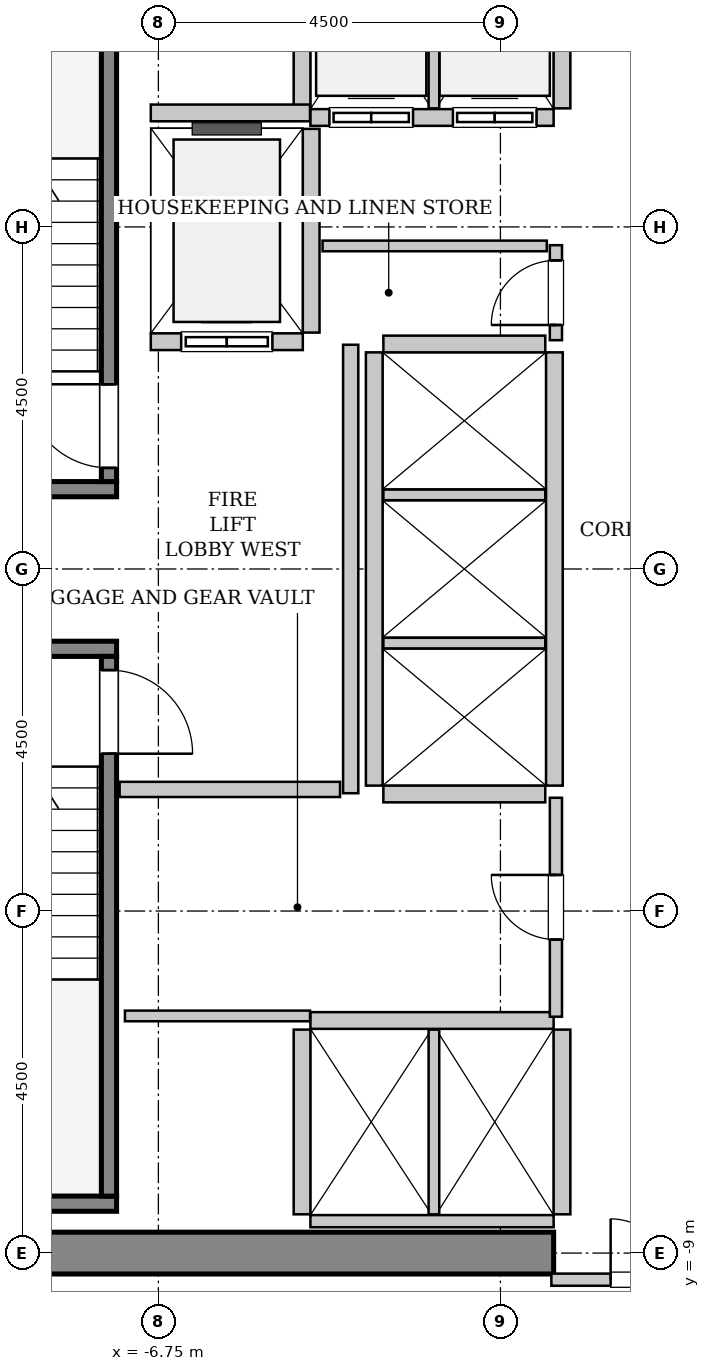
"""IFC4 building model, lengths in metres.
Left out: names, types, materials, properties, quantities, classifications, styles, units other than length and angle.
Written with IfcOpenShell. Run it as: python <this file> out.ifc"""

import sys

from ifc_helpers import new_model, si_unit, direction, frame, frame_2d, origin, place, context, subcontext, project, spatial, rectangle, extrude, source, transform, mapped, element, fill, save


model = new_model("IFC4")
c1 = context("Model", 3, precision=1e-05, world=origin(), true_north=direction((0.0, 1.0)))
c2 = subcontext(c1, "Body", "Model", "MODEL_VIEW")
j1 = project(units=[si_unit("LENGTHUNIT", "METRE"), si_unit("PLANEANGLEUNIT", "RADIAN")], contexts=[c1])
p1 = place(None, origin())
s1 = spatial("IfcSite", under=j1, at=p1, CompositionType="ELEMENT")
p2 = place(p1, origin())
s2 = spatial("IfcBuilding", under=s1, at=p2, CompositionType="ELEMENT")
p3 = place(p2, frame((0.0, 0.0, 132.6)))
s3 = spatial("IfcBuildingStorey", under=s2, at=p3, CompositionType="ELEMENT", Elevation=132.6)
m1 = source(origin(), c2, "Body", "SweptSolid", [
    extrude(rectangle(XDim=9.975, YDim=0.55, at=frame_2d((4.987, 0.0))), origin(), (0.0, 0.0, 1.0), 3.8),
])
p4 = place(p3, frame((-11.525, -9.0, 0.0), z_axis=(0.0, 0.0, 1.0), x_axis=(1.0, 0.0, 0.0)))
e1 = element("IfcWall", 1, at=p4, inside=s3, PredefinedType="SHEAR", context=c2, shape_type="MappedRepresentation", body=[
    mapped(m1, transform((0.0, 0.0, 0.0), x_axis=(1.0, 0.0, 0.0), y_axis=(0.0, 1.0, 0.0), z_axis=(0.0, 0.0, 1.0), scale=1.0)),
])
m2 = source(origin(), c2, "Body", "SweptSolid", [
    extrude(rectangle(XDim=3.4, YDim=0.2, at=frame_2d((1.7, 0.0))), origin(), (0.0, 0.0, 1.0), 3.8),
])
p5 = place(p3, frame((-7.3, 1.05, 0.0), z_axis=(0.0, 0.0, 1.0), x_axis=(-1.0, 0.0, 0.0)))
e2 = element("IfcWall", 2, at=p5, inside=s3, PredefinedType="SOLIDWALL", context=c2, shape_type="MappedRepresentation", body=[
    mapped(m2, transform((0.0, 0.0, 0.0), x_axis=(1.0, 0.0, 0.0), y_axis=(0.0, 1.0, 0.0), z_axis=(0.0, 0.0, 1.0), scale=1.0)),
])
m3 = source(origin(), c2, "Body", "SweptSolid", [
    extrude(rectangle(XDim=7.1, YDim=0.2, at=frame_2d((3.55, 0.0))), origin(), (0.0, 0.0, 1.0), 3.8),
])
p6 = place(p3, frame((-7.4, 1.15, 0.0), z_axis=(0.0, 0.0, 1.0), x_axis=(0.0, 1.0, 0.0)))
e3 = element("IfcWall", 3, at=p6, inside=s3, PredefinedType="SOLIDWALL", context=c2, shape_type="MappedRepresentation", body=[
    mapped(m3, transform((0.0, 0.0, 0.0), x_axis=(1.0, 0.0, 0.0), y_axis=(0.0, 1.0, 0.0), z_axis=(0.0, 0.0, 1.0), scale=1.0)),
])
p7 = place(p6, frame((0.18, 0.0, 0.0)))
e4 = element("IfcOpeningElement", 4, at=p7, cuts=e3, PredefinedType="OPENING", context=c2, shape_type="SweptSolid", body=[
    extrude(rectangle(XDim=1.1, YDim=2.15, at=frame_2d((0.55, 1.075))), frame((0.0, 0.11, 0.0), z_axis=(0.0, -1.0, 0.0), x_axis=(1.0, 0.0, 0.0)), (0.0, 0.0, 1.0), 0.22),
])
p8 = place(p3, frame((-10.7, -1.05, 0.0), z_axis=(0.0, 0.0, 1.0), x_axis=(1.0, 0.0, 0.0)))
e5 = element("IfcWall", 5, at=p8, inside=s3, PredefinedType="SOLIDWALL", context=c2, shape_type="MappedRepresentation", body=[
    mapped(m2, transform((0.0, 0.0, 0.0), x_axis=(1.0, 0.0, 0.0), y_axis=(0.0, 1.0, 0.0), z_axis=(0.0, 0.0, 1.0), scale=1.0)),
])
m4 = source(origin(), c2, "Body", "SweptSolid", [
    extrude(rectangle(XDim=3.68, YDim=0.2, at=frame_2d((1.84, 0.0))), origin(), (0.0, 0.0, 1.0), 3.8),
])
p9 = place(p3, frame((-10.98, -8.35, 0.0), z_axis=(0.0, 0.0, 1.0), x_axis=(1.0, 0.0, 0.0)))
e6 = element("IfcWall", 6, at=p9, inside=s3, PredefinedType="SOLIDWALL", context=c2, shape_type="MappedRepresentation", body=[
    mapped(m4, transform((0.0, 0.0, 0.0), x_axis=(1.0, 0.0, 0.0), y_axis=(0.0, 1.0, 0.0), z_axis=(0.0, 0.0, 1.0), scale=1.0)),
])
p10 = place(p3, frame((-7.4, -1.15, 0.0), z_axis=(0.0, 0.0, 1.0), x_axis=(0.0, -1.0, 0.0)))
e7 = element("IfcWall", 7, at=p10, inside=s3, PredefinedType="SOLIDWALL", context=c2, shape_type="MappedRepresentation", body=[
    mapped(m3, transform((0.0, 0.0, 0.0), x_axis=(1.0, 0.0, 0.0), y_axis=(0.0, 1.0, 0.0), z_axis=(0.0, 0.0, 1.0), scale=1.0)),
])
p11 = place(p10, frame((0.18, 0.0, 0.0)))
e8 = element("IfcOpeningElement", 8, at=p11, cuts=e7, PredefinedType="OPENING", context=c2, shape_type="SweptSolid", body=[
    extrude(rectangle(XDim=1.1, YDim=2.15, at=frame_2d((0.55, 1.075))), frame((0.0, 0.11, 0.0), z_axis=(0.0, -1.0, 0.0), x_axis=(1.0, 0.0, 0.0)), (0.0, 0.0, 1.0), 0.22),
])
m5 = source(origin(), c2, "Body", "SweptSolid", [
    extrude(rectangle(XDim=2.0, YDim=0.22, at=frame_2d((1.0, 0.0))), origin(), (0.0, 0.0, 1.0), 3.535),
])
p12 = place(p3, frame((-6.85, 2.99, 0.0), z_axis=(0.0, 0.0, 1.0), x_axis=(1.0, 0.0, 0.0)))
e9 = element("IfcWall", 9, at=p12, inside=s3, PredefinedType="SOLIDWALL", context=c2, shape_type="MappedRepresentation", body=[
    mapped(m5, transform((0.0, 0.0, 0.0), x_axis=(1.0, 0.0, 0.0), y_axis=(0.0, 1.0, 0.0), z_axis=(0.0, 0.0, 1.0), scale=1.0)),
])
p13 = place(p12, frame((0.4, 0.0, 0.0)))
e10 = element("IfcOpeningElement", 10, at=p13, cuts=e9, PredefinedType="OPENING", context=c2, shape_type="SweptSolid", body=[
    extrude(rectangle(XDim=1.2, YDim=2.2, at=frame_2d((0.6, 1.1))), frame((0.0, 0.12, 0.0), z_axis=(0.0, -1.0, 0.0), x_axis=(1.0, 0.0, 0.0)), (0.0, 0.0, 1.0), 0.24),
])
m6 = source(origin(), c2, "Body", "SweptSolid", [
    extrude(rectangle(XDim=2.68, YDim=0.22, at=frame_2d((1.34, 0.0))), origin(), (0.0, 0.0, 1.0), 3.535),
])
p14 = place(p3, frame((-4.74, 3.11, 0.0), z_axis=(0.0, 0.0, 1.0), x_axis=(0.0, 1.0, 0.0)))
e11 = element("IfcWall", 11, at=p14, inside=s3, PredefinedType="SOLIDWALL", context=c2, shape_type="MappedRepresentation", body=[
    mapped(m6, transform((0.0, 0.0, 0.0), x_axis=(1.0, 0.0, 0.0), y_axis=(0.0, 1.0, 0.0), z_axis=(0.0, 0.0, 1.0), scale=1.0)),
])
m7 = source(origin(), c2, "Body", "SweptSolid", [
    extrude(rectangle(XDim=3.2, YDim=0.22, at=frame_2d((1.6, 0.0))), origin(), (0.0, 0.0, 1.0), 3.535),
])
p15 = place(p3, frame((-4.75, 5.94, 0.0), z_axis=(0.0, 0.0, 1.0), x_axis=(1.0, 0.0, 0.0)))
e12 = element("IfcWall", 12, at=p15, inside=s3, PredefinedType="SOLIDWALL", context=c2, shape_type="MappedRepresentation", body=[
    mapped(m7, transform((0.0, 0.0, 0.0), x_axis=(1.0, 0.0, 0.0), y_axis=(0.0, 1.0, 0.0), z_axis=(0.0, 0.0, 1.0), scale=1.0)),
])
p16 = place(p15, frame((0.25, 0.0, 0.0)))
e13 = element("IfcOpeningElement", 13, at=p16, cuts=e12, PredefinedType="OPENING", context=c2, shape_type="SweptSolid", body=[
    extrude(rectangle(XDim=1.1, YDim=2.2, at=frame_2d((0.55, 1.1))), frame((0.0, 0.12, 0.0), z_axis=(0.0, -1.0, 0.0), x_axis=(1.0, 0.0, 0.0)), (0.0, 0.0, 1.0), 0.24),
])
p17 = place(p15, frame((1.875, 0.0, 0.0)))
e14 = element("IfcOpeningElement", 14, at=p17, cuts=e12, PredefinedType="OPENING", context=c2, shape_type="SweptSolid", body=[
    extrude(rectangle(XDim=1.1, YDim=2.2, at=frame_2d((0.55, 1.1))), frame((0.0, 0.12, 0.0), z_axis=(0.0, -1.0, 0.0), x_axis=(1.0, 0.0, 0.0)), (0.0, 0.0, 1.0), 0.24),
])
m8 = source(origin(), c2, "Body", "SweptSolid", [
    extrude(rectangle(XDim=2.43, YDim=0.22, at=frame_2d((1.215, 0.0))), origin(), (0.0, 0.0, 1.0), 3.535),
])
p18 = place(p3, frame((-4.86, 8.49, 0.0), z_axis=(0.0, 0.0, 1.0), x_axis=(0.0, -1.0, 0.0)))
e15 = element("IfcWall", 15, at=p18, inside=s3, PredefinedType="SOLIDWALL", context=c2, shape_type="MappedRepresentation", body=[
    mapped(m8, transform((0.0, 0.0, 0.0), x_axis=(1.0, 0.0, 0.0), y_axis=(0.0, 1.0, 0.0), z_axis=(0.0, 0.0, 1.0), scale=1.0)),
])
m9 = source(origin(), c2, "Body", "SweptSolid", [
    extrude(rectangle(XDim=2.43, YDim=0.14, at=frame_2d((1.215, 0.0))), origin(), (0.0, 0.0, 1.0), 3.535),
])
p19 = place(p3, frame((-3.125, 6.06, 0.0), z_axis=(0.0, 0.0, 1.0), x_axis=(0.0, 1.0, 0.0)))
e16 = element("IfcWall", 16, at=p19, inside=s3, PredefinedType="PARTITIONING", context=c2, shape_type="MappedRepresentation", body=[
    mapped(m9, transform((0.0, 0.0, 0.0), x_axis=(1.0, 0.0, 0.0), y_axis=(0.0, 1.0, 0.0), z_axis=(0.0, 0.0, 1.0), scale=1.0)),
])
p20 = place(p3, frame((-1.44, 6.06, 0.0), z_axis=(0.0, 0.0, 1.0), x_axis=(0.0, 1.0, 0.0)))
e17 = element("IfcWall", 17, at=p20, inside=s3, PredefinedType="SOLIDWALL", context=c2, shape_type="MappedRepresentation", body=[
    mapped(m8, transform((0.0, 0.0, 0.0), x_axis=(1.0, 0.0, 0.0), y_axis=(0.0, 1.0, 0.0), z_axis=(0.0, 0.0, 1.0), scale=1.0)),
])
p21 = place(p3, frame((-1.55, -5.94, 0.0), z_axis=(0.0, 0.0, 1.0), x_axis=(-1.0, 0.0, 0.0)))
e18 = element("IfcWall", 18, at=p21, inside=s3, PredefinedType="SOLIDWALL", context=c2, shape_type="MappedRepresentation", body=[
    mapped(m7, transform((0.0, 0.0, 0.0), x_axis=(1.0, 0.0, 0.0), y_axis=(0.0, 1.0, 0.0), z_axis=(0.0, 0.0, 1.0), scale=1.0)),
])
m10 = source(origin(), c2, "Body", "SweptSolid", [
    extrude(rectangle(XDim=3.2, YDim=0.16, at=frame_2d((1.6, 0.0))), origin(), (0.0, 0.0, 1.0), 2.425),
])
p22 = place(p3, frame((-4.75, -8.58, 0.0), z_axis=(0.0, 0.0, 1.0), x_axis=(1.0, 0.0, 0.0)))
e19 = element("IfcWall", 19, at=p22, inside=s3, PredefinedType="PARTITIONING", context=c2, shape_type="MappedRepresentation", body=[
    mapped(m10, transform((0.0, 0.0, 0.0), x_axis=(1.0, 0.0, 0.0), y_axis=(0.0, 1.0, 0.0), z_axis=(0.0, 0.0, 1.0), scale=1.0)),
])
p23 = place(p3, frame((-4.86, -6.06, 0.0), z_axis=(0.0, 0.0, 1.0), x_axis=(0.0, -1.0, 0.0)))
e20 = element("IfcWall", 20, at=p23, inside=s3, PredefinedType="SOLIDWALL", context=c2, shape_type="MappedRepresentation", body=[
    mapped(m8, transform((0.0, 0.0, 0.0), x_axis=(1.0, 0.0, 0.0), y_axis=(0.0, 1.0, 0.0), z_axis=(0.0, 0.0, 1.0), scale=1.0)),
])
p24 = place(p3, frame((-3.125, -8.49, 0.0), z_axis=(0.0, 0.0, 1.0), x_axis=(0.0, 1.0, 0.0)))
e21 = element("IfcWall", 21, at=p24, inside=s3, PredefinedType="PARTITIONING", context=c2, shape_type="MappedRepresentation", body=[
    mapped(m9, transform((0.0, 0.0, 0.0), x_axis=(1.0, 0.0, 0.0), y_axis=(0.0, 1.0, 0.0), z_axis=(0.0, 0.0, 1.0), scale=1.0)),
])
p25 = place(p3, frame((-1.44, -8.49, 0.0), z_axis=(0.0, 0.0, 1.0), x_axis=(0.0, 1.0, 0.0)))
e22 = element("IfcWall", 22, at=p25, inside=s3, PredefinedType="SOLIDWALL", context=c2, shape_type="MappedRepresentation", body=[
    mapped(m8, transform((0.0, 0.0, 0.0), x_axis=(1.0, 0.0, 0.0), y_axis=(0.0, 1.0, 0.0), z_axis=(0.0, 0.0, 1.0), scale=1.0)),
])
m11 = source(origin(), c2, "Body", "SweptSolid", [
    extrude(rectangle(XDim=5.7, YDim=0.22, at=frame_2d((2.85, 0.0))), origin(), (0.0, 0.0, 1.0), 3.535),
])
for number, where, z_axis, x_axis in (
    (23, (-1.54, -2.85, 0.0), (0.0, 0.0, 1.0), (0.0, 1.0, 0.0)),
    (24, (-3.91, 2.85, 0.0), (0.0, 0.0, 1.0), (0.0, -1.0, 0.0)),
):
    element("IfcWall", number, at=place(p3, frame(where, z_axis=z_axis, x_axis=x_axis)), inside=s3, PredefinedType="SOLIDWALL", context=c2, shape_type="MappedRepresentation", body=[
        mapped(m11, transform((0.0, 0.0, 0.0), x_axis=(1.0, 0.0, 0.0), y_axis=(0.0, 1.0, 0.0), z_axis=(0.0, 0.0, 1.0), scale=1.0)),
    ])
m12 = source(origin(), c2, "Body", "SweptSolid", [
    extrude(rectangle(XDim=2.13, YDim=0.22, at=frame_2d((1.065, 0.0))), origin(), (0.0, 0.0, 1.0), 3.535),
])
p26 = place(p3, frame((-3.79, -2.96, 0.0), z_axis=(0.0, 0.0, 1.0), x_axis=(1.0, 0.0, 0.0)))
e25 = element("IfcWall", 25, at=p26, inside=s3, PredefinedType="SOLIDWALL", context=c2, shape_type="MappedRepresentation", body=[
    mapped(m12, transform((0.0, 0.0, 0.0), x_axis=(1.0, 0.0, 0.0), y_axis=(0.0, 1.0, 0.0), z_axis=(0.0, 0.0, 1.0), scale=1.0)),
])
m13 = source(origin(), c2, "Body", "SweptSolid", [
    extrude(rectangle(XDim=2.13, YDim=0.14, at=frame_2d((1.065, 0.0))), origin(), (0.0, 0.0, 1.0), 3.535),
])
for number, where, z_axis, x_axis in (
    (26, (-3.79, -0.975, 0.0), (0.0, 0.0, 1.0), (1.0, 0.0, 0.0)),
    (27, (-3.79, 0.975, 0.0), (0.0, 0.0, 1.0), (1.0, 0.0, 0.0)),
):
    element("IfcWall", number, at=place(p3, frame(where, z_axis=z_axis, x_axis=x_axis)), inside=s3, PredefinedType="PARTITIONING", context=c2, shape_type="MappedRepresentation", body=[
        mapped(m13, transform((0.0, 0.0, 0.0), x_axis=(1.0, 0.0, 0.0), y_axis=(0.0, 1.0, 0.0), z_axis=(0.0, 0.0, 1.0), scale=1.0)),
    ])
p27 = place(p3, frame((-1.66, 2.96, 0.0), z_axis=(0.0, 0.0, 1.0), x_axis=(-1.0, 0.0, 0.0)))
e28 = element("IfcWall", 28, at=p27, inside=s3, PredefinedType="SOLIDWALL", context=c2, shape_type="MappedRepresentation", body=[
    mapped(m12, transform((0.0, 0.0, 0.0), x_axis=(1.0, 0.0, 0.0), y_axis=(0.0, 1.0, 0.0), z_axis=(0.0, 0.0, 1.0), scale=1.0)),
])
m14 = source(origin(), c2, "Body", "SweptSolid", [
    extrude(rectangle(XDim=2.095, YDim=0.22, at=frame_2d((1.048, 0.0))), origin(), (0.0, 0.0, 1.0), 3.535),
])
p28 = place(p3, frame((-6.85, 6.0, 0.0), z_axis=(0.0, 0.0, 1.0), x_axis=(1.0, 0.0, 0.0)))
e29 = element("IfcWall", 29, at=p28, inside=s3, PredefinedType="SOLIDWALL", context=c2, shape_type="MappedRepresentation", body=[
    mapped(m14, transform((0.0, 0.0, 0.0), x_axis=(1.0, 0.0, 0.0), y_axis=(0.0, 1.0, 0.0), z_axis=(0.0, 0.0, 1.0), scale=1.0)),
])
m15 = source(origin(), c2, "Body", "SweptSolid", [
    extrude(rectangle(XDim=5.9, YDim=0.2, at=frame_2d((2.95, 0.0))), origin(), (0.0, 0.0, 1.0), 3.535),
])
p29 = place(p3, frame((-4.22, -2.95, 0.0), z_axis=(0.0, 0.0, 1.0), x_axis=(0.0, 1.0, 0.0)))
e30 = element("IfcWall", 30, at=p29, inside=s3, PredefinedType="PARTITIONING", context=c2, shape_type="MappedRepresentation", body=[
    mapped(m15, transform((0.0, 0.0, 0.0), x_axis=(1.0, 0.0, 0.0), y_axis=(0.0, 1.0, 0.0), z_axis=(0.0, 0.0, 1.0), scale=1.0)),
])
m16 = source(origin(), c2, "Body", "SweptSolid", [
    extrude(rectangle(XDim=2.9, YDim=0.2, at=frame_2d((1.45, 0.0))), origin(), (0.0, 0.0, 1.0), 3.535),
])
p30 = place(p3, frame((-7.26, -2.9, 0.0), z_axis=(0.0, 0.0, 1.0), x_axis=(1.0, 0.0, 0.0)))
e31 = element("IfcWall", 31, at=p30, inside=s3, PredefinedType="PARTITIONING", context=c2, shape_type="MappedRepresentation", body=[
    mapped(m16, transform((0.0, 0.0, 0.0), x_axis=(1.0, 0.0, 0.0), y_axis=(0.0, 1.0, 0.0), z_axis=(0.0, 0.0, 1.0), scale=1.0)),
])
m17 = source(origin(), c2, "Body", "SweptSolid", [
    extrude(rectangle(XDim=3.16, YDim=0.16, at=frame_2d((1.58, 0.0))), origin(), (0.0, 0.0, 1.0), 2.425),
])
p31 = place(p3, frame((-1.58, -9.35, 0.0), z_axis=(0.0, 0.0, 1.0), x_axis=(1.0, 0.0, 0.0)))
e32 = element("IfcWall", 32, at=p31, inside=s3, PredefinedType="PARTITIONING", context=c2, shape_type="MappedRepresentation", body=[
    mapped(m17, transform((0.0, 0.0, 0.0), x_axis=(1.0, 0.0, 0.0), y_axis=(0.0, 1.0, 0.0), z_axis=(0.0, 0.0, 1.0), scale=1.0)),
])
p32 = place(p31, frame((0.78, 0.0, 0.0)))
e33 = element("IfcOpeningElement", 33, at=p32, cuts=e32, PredefinedType="OPENING", context=c2, shape_type="SweptSolid", body=[
    extrude(rectangle(XDim=1.6, YDim=2.3, at=frame_2d((0.8, 1.15))), frame((0.0, 0.09, 0.0), z_axis=(0.0, -1.0, 0.0), x_axis=(1.0, 0.0, 0.0)), (0.0, 0.0, 1.0), 0.18),
])
m18 = source(origin(), c2, "Body", "SweptSolid", [
    extrude(rectangle(XDim=1.25, YDim=0.16, at=frame_2d((0.625, 0.0))), origin(), (0.0, 0.0, 1.0), 3.535),
])
p33 = place(p3, frame((-1.52, 3.01, 0.0), z_axis=(0.0, 0.0, 1.0), x_axis=(0.0, 1.0, 0.0)))
e34 = element("IfcWall", 34, at=p33, inside=s3, PredefinedType="PARTITIONING", context=c2, shape_type="MappedRepresentation", body=[
    mapped(m18, transform((0.0, 0.0, 0.0), x_axis=(1.0, 0.0, 0.0), y_axis=(0.0, 1.0, 0.0), z_axis=(0.0, 0.0, 1.0), scale=1.0)),
])
p34 = place(p33, frame((0.2, 0.0, 0.0)))
e35 = element("IfcOpeningElement", 35, at=p34, cuts=e34, PredefinedType="OPENING", context=c2, shape_type="SweptSolid", body=[
    extrude(rectangle(XDim=0.85, YDim=2.1, at=frame_2d((0.425, 1.05))), frame((0.0, 0.09, 0.0), z_axis=(0.0, -1.0, 0.0), x_axis=(1.0, 0.0, 0.0)), (0.0, 0.0, 1.0), 0.18),
])
m19 = source(origin(), c2, "Body", "SweptSolid", [
    extrude(rectangle(XDim=2.95, YDim=0.14, at=frame_2d((1.475, 0.0))), origin(), (0.0, 0.0, 1.0), 3.535),
])
p35 = place(p3, frame((-4.59, 4.25, 0.0), z_axis=(0.0, 0.0, 1.0), x_axis=(1.0, 0.0, 0.0)))
e36 = element("IfcWall", 36, at=p35, inside=s3, PredefinedType="PARTITIONING", context=c2, shape_type="MappedRepresentation", body=[
    mapped(m19, transform((0.0, 0.0, 0.0), x_axis=(1.0, 0.0, 0.0), y_axis=(0.0, 1.0, 0.0), z_axis=(0.0, 0.0, 1.0), scale=1.0)),
])
m20 = source(origin(), c2, "Body", "SweptSolid", [
    extrude(rectangle(XDim=2.88, YDim=0.16, at=frame_2d((1.44, 0.0))), origin(), (0.0, 0.0, 1.0), 3.535),
])
p36 = place(p3, frame((-1.52, -5.89, 0.0), z_axis=(0.0, 0.0, 1.0), x_axis=(0.0, 1.0, 0.0)))
e37 = element("IfcWall", 37, at=p36, inside=s3, PredefinedType="PARTITIONING", context=c2, shape_type="MappedRepresentation", body=[
    mapped(m20, transform((0.0, 0.0, 0.0), x_axis=(1.0, 0.0, 0.0), y_axis=(0.0, 1.0, 0.0), z_axis=(0.0, 0.0, 1.0), scale=1.0)),
])
p37 = place(p36, frame((1.015, 0.0, 0.0)))
e38 = element("IfcOpeningElement", 38, at=p37, cuts=e37, PredefinedType="OPENING", context=c2, shape_type="SweptSolid", body=[
    extrude(rectangle(XDim=0.85, YDim=2.1, at=frame_2d((0.425, 1.05))), frame((0.0, 0.09, 0.0), z_axis=(0.0, -1.0, 0.0), x_axis=(1.0, 0.0, 0.0)), (0.0, 0.0, 1.0), 0.18),
])
m21 = source(origin(), c2, "Body", "SweptSolid", [
    extrude(rectangle(XDim=2.435, YDim=0.14, at=frame_2d((1.218, 0.0))), origin(), (0.0, 0.0, 1.0), 3.535),
])
p38 = place(p3, frame((-7.19, -5.88, 0.0), z_axis=(0.0, 0.0, 1.0), x_axis=(1.0, 0.0, 0.0)))
e39 = element("IfcWall", 39, at=p38, inside=s3, PredefinedType="PARTITIONING", context=c2, shape_type="MappedRepresentation", body=[
    mapped(m21, transform((0.0, 0.0, 0.0), x_axis=(1.0, 0.0, 0.0), y_axis=(0.0, 1.0, 0.0), z_axis=(0.0, 0.0, 1.0), scale=1.0)),
])
m22 = source(origin(), c2, "Body", "SweptSolid", [
    extrude(rectangle(XDim=1.1, YDim=2.15, at=frame_2d((0.55, 1.075))), frame((0.0, 0.025, 0.0), z_axis=(0.0, -1.0, 0.0), x_axis=(1.0, 0.0, 0.0)), (0.0, 0.0, 1.0), 0.05),
])
p39 = place(p7, origin())
e40 = element("IfcDoor", 40, at=p39, inside=s3, OperationType="SINGLE_SWING_RIGHT", PredefinedType="DOOR", context=c2, shape_type="MappedRepresentation", body=[
    mapped(m22, transform((0.0, 0.0, 0.0), x_axis=(1.0, 0.0, 0.0), y_axis=(0.0, 1.0, 0.0), z_axis=(0.0, 0.0, 1.0), scale=1.0)),
])
fill(e4, e40)
p40 = place(p11, origin())
e41 = element("IfcDoor", 41, at=p40, inside=s3, OperationType="SINGLE_SWING_RIGHT", PredefinedType="DOOR", context=c2, shape_type="MappedRepresentation", body=[
    mapped(m22, transform((0.0, 0.0, 0.0), x_axis=(1.0, 0.0, 0.0), y_axis=(0.0, 1.0, 0.0), z_axis=(0.0, 0.0, 1.0), scale=1.0)),
])
fill(e8, e41)
m23 = source(origin(), c2, "Body", "SweptSolid", [
    extrude(rectangle(XDim=1.2, YDim=2.2, at=frame_2d((0.6, 1.1))), frame((0.0, 0.025, 0.0), z_axis=(0.0, -1.0, 0.0), x_axis=(1.0, 0.0, 0.0)), (0.0, 0.0, 1.0), 0.05),
])
p41 = place(p13, origin())
e42 = element("IfcDoor", 42, at=p41, inside=s3, OperationType="SLIDING_TO_LEFT", PredefinedType="DOOR", context=c2, shape_type="MappedRepresentation", body=[
    mapped(m23, transform((0.0, 0.0, 0.0), x_axis=(1.0, 0.0, 0.0), y_axis=(0.0, 1.0, 0.0), z_axis=(0.0, 0.0, 1.0), scale=1.0)),
])
fill(e10, e42)
m24 = source(origin(), c2, "Body", "SweptSolid", [
    extrude(rectangle(XDim=1.1, YDim=2.2, at=frame_2d((0.55, 1.1))), frame((0.0, 0.025, 0.0), z_axis=(0.0, -1.0, 0.0), x_axis=(1.0, 0.0, 0.0)), (0.0, 0.0, 1.0), 0.05),
])
p42 = place(p16, origin())
e43 = element("IfcDoor", 43, at=p42, inside=s3, OperationType="DOUBLE_DOOR_SLIDING", PredefinedType="DOOR", context=c2, shape_type="MappedRepresentation", body=[
    mapped(m24, transform((0.0, 0.0, 0.0), x_axis=(1.0, 0.0, 0.0), y_axis=(0.0, 1.0, 0.0), z_axis=(0.0, 0.0, 1.0), scale=1.0)),
])
fill(e13, e43)
p43 = place(p17, origin())
e44 = element("IfcDoor", 44, at=p43, inside=s3, OperationType="DOUBLE_DOOR_SLIDING", PredefinedType="DOOR", context=c2, shape_type="MappedRepresentation", body=[
    mapped(m24, transform((0.0, 0.0, 0.0), x_axis=(1.0, 0.0, 0.0), y_axis=(0.0, 1.0, 0.0), z_axis=(0.0, 0.0, 1.0), scale=1.0)),
])
fill(e14, e44)
m25 = source(origin(), c2, "Body", "SweptSolid", [
    extrude(rectangle(XDim=1.6, YDim=2.3, at=frame_2d((0.8, 1.15))), frame((0.0, 0.025, 0.0), z_axis=(0.0, -1.0, 0.0), x_axis=(1.0, 0.0, 0.0)), (0.0, 0.0, 1.0), 0.05),
])
p44 = place(p32, origin())
e45 = element("IfcDoor", 45, at=p44, inside=s3, OperationType="DOUBLE_DOOR_SINGLE_SWING", PredefinedType="DOOR", context=c2, shape_type="MappedRepresentation", body=[
    mapped(m25, transform((0.0, 0.0, 0.0), x_axis=(1.0, 0.0, 0.0), y_axis=(0.0, 1.0, 0.0), z_axis=(0.0, 0.0, 1.0), scale=1.0)),
])
fill(e33, e45)
m26 = source(origin(), c2, "Body", "SweptSolid", [
    extrude(rectangle(XDim=0.85, YDim=2.1, at=frame_2d((0.425, 1.05))), frame((0.0, 0.025, 0.0), z_axis=(0.0, -1.0, 0.0), x_axis=(1.0, 0.0, 0.0)), (0.0, 0.0, 1.0), 0.05),
])
p45 = place(p34, origin())
e46 = element("IfcDoor", 46, at=p45, inside=s3, OperationType="SINGLE_SWING_LEFT", PredefinedType="DOOR", context=c2, shape_type="MappedRepresentation", body=[
    mapped(m26, transform((0.0, 0.0, 0.0), x_axis=(1.0, 0.0, 0.0), y_axis=(0.0, 1.0, 0.0), z_axis=(0.0, 0.0, 1.0), scale=1.0)),
])
fill(e35, e46)
p46 = place(p37, origin())
e47 = element("IfcDoor", 47, at=p46, inside=s3, OperationType="SINGLE_SWING_RIGHT", PredefinedType="DOOR", context=c2, shape_type="MappedRepresentation", body=[
    mapped(m26, transform((0.0, 0.0, 0.0), x_axis=(1.0, 0.0, 0.0), y_axis=(0.0, 1.0, 0.0), z_axis=(0.0, 0.0, 1.0), scale=1.0)),
])
fill(e38, e47)
save(model, sys.argv[1])
